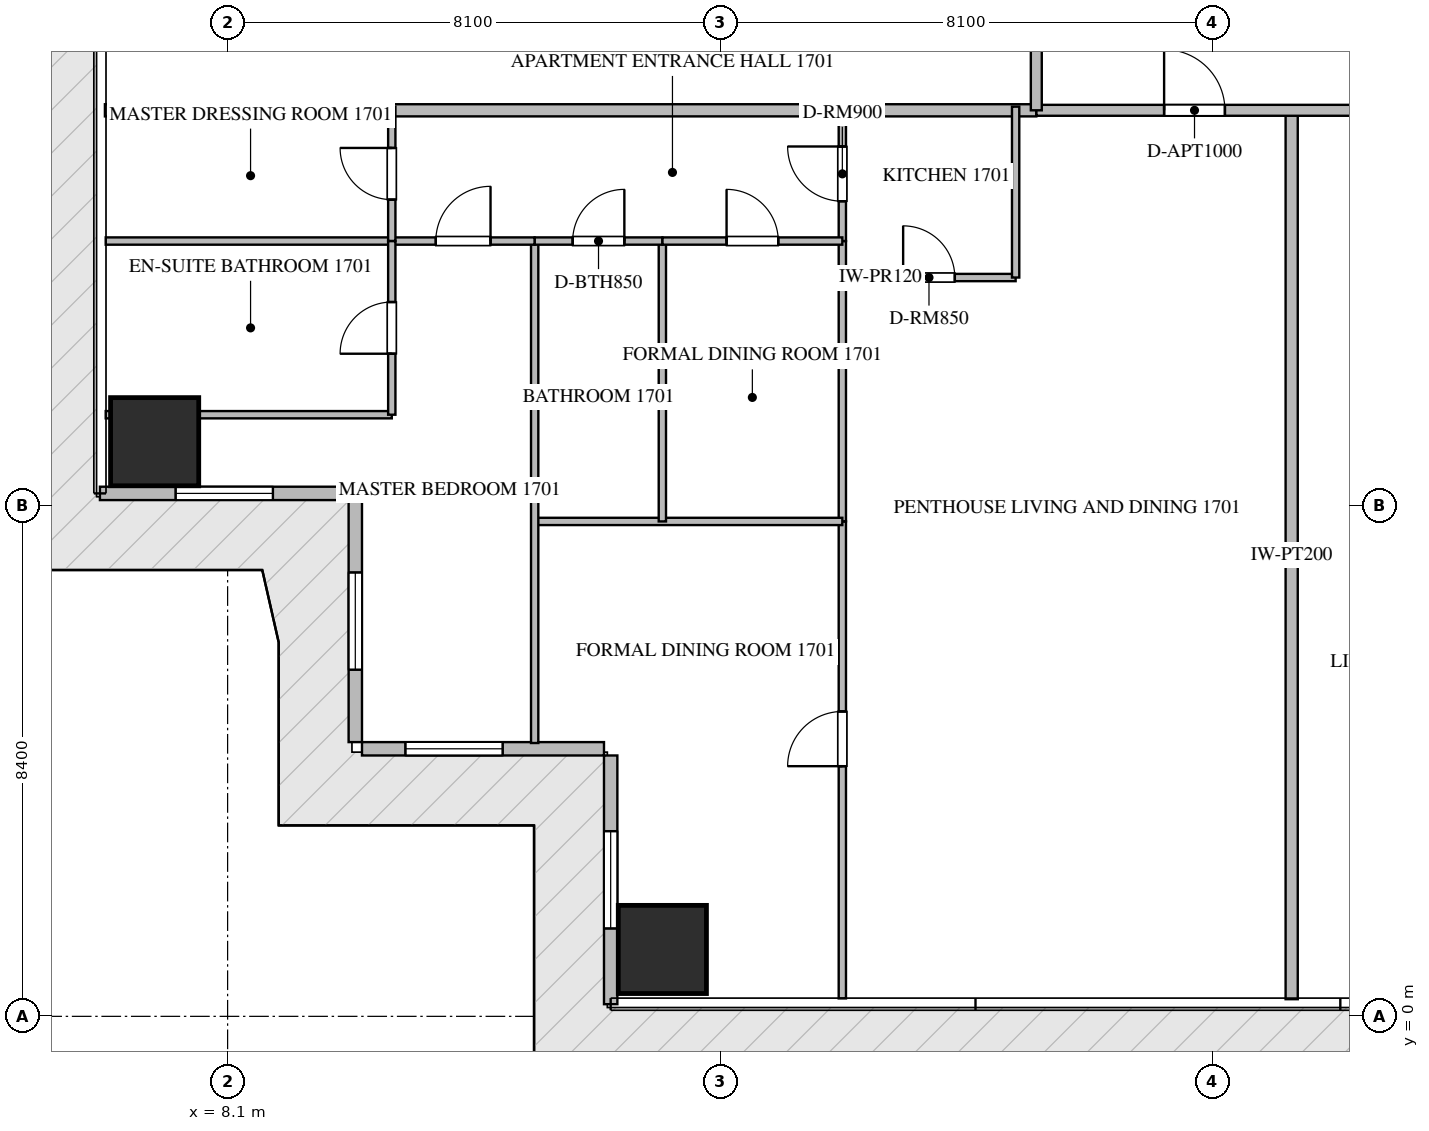
"""IFC4 building model, lengths in metres.
Left out: names, types, materials, properties, quantities, classifications, styles, units other than length and angle.
Written with IfcOpenShell. Run it as: python <this file> out.ifc"""

import sys

from ifc_helpers import new_model, si_unit, direction, frame, frame_2d, origin, origin_2d, place, context, subcontext, project, spatial, rectangle, extrude, source, transform, mapped, element, fill, save


model = new_model("IFC4")
c1 = context("Model", 3, precision=1e-05, world=origin(), true_north=direction((0.0, 1.0)))
c2 = subcontext(c1, "Body", "Model", "MODEL_VIEW")
j1 = project(units=[si_unit("LENGTHUNIT", "METRE"), si_unit("PLANEANGLEUNIT", "RADIAN")], contexts=[c1])
p1 = place(None, origin())
s1 = spatial("IfcSite", under=j1, at=p1, CompositionType="ELEMENT")
p2 = place(p1, origin())
s2 = spatial("IfcBuilding", under=s1, at=p2, CompositionType="ELEMENT")
p3 = place(p2, frame((0.0, 0.0, 71.7)))
s3 = spatial("IfcBuildingStorey", under=s2, at=p3, CompositionType="ELEMENT", Elevation=71.7)
m1 = source(origin(), c2, "Body", "SweptSolid", [
    extrude(rectangle(XDim=1.45, YDim=1.45, at=origin_2d()), origin(), (0.0, 0.0, 1.0), 3.75),
])
for number, where, z_axis, x_axis in (
    (1, (15.25, 1.1, -0.26), (0.0, 0.0, 1.0), (1.0, 0.0, 0.0)),
    (2, (6.9, 9.45, -0.26), (0.0, 0.0, 1.0), (1.0, 0.0, 0.0)),
):
    element("IfcColumn", number, at=place(p3, frame(where, z_axis=z_axis, x_axis=x_axis)), inside=s3, PredefinedType="COLUMN", context=c2, shape_type="MappedRepresentation", body=[
        mapped(m1, transform((0.0, 0.0, 0.0), scale=1.0)),
    ])
p4 = place(p3, frame((6.0, 8.6, 0.0), z_axis=(0.0, 0.0, 1.0), x_axis=(1.0, 0.0, 0.0)))
e3 = element("IfcWall", 3, at=p4, inside=s3, PredefinedType="ELEMENTEDWALL", context=c2, shape_type="SweptSolid", body=[
    extrude(rectangle(XDim=4.09, YDim=0.22, at=frame_2d((2.045, 0.0))), origin(), (0.0, 0.0, 1.0), 3.475),
])
p5 = place(p4, frame((1.245, 0.0, 0.65)))
e4 = element("IfcOpeningElement", 4, at=p5, cuts=e3, PredefinedType="OPENING", context=c2, shape_type="SweptSolid", body=[
    extrude(rectangle(XDim=1.6, YDim=2.1, at=frame_2d((0.8, 1.05))), frame((0.0, 0.12, 0.0), z_axis=(0.0, -1.0, 0.0), x_axis=(1.0, 0.0, 0.0)), (0.0, 0.0, 1.0), 0.24),
])
p6 = place(p3, frame((10.2, 8.49, 0.0), z_axis=(0.0, 0.0, 1.0), x_axis=(0.0, -1.0, 0.0)))
e5 = element("IfcWall", 5, at=p6, inside=s3, PredefinedType="ELEMENTEDWALL", context=c2, shape_type="SweptSolid", body=[
    extrude(rectangle(XDim=3.98, YDim=0.22, at=frame_2d((1.99, 0.0))), origin(), (0.0, 0.0, 1.0), 3.475),
])
p7 = place(p6, frame((1.19, 0.0, 0.65)))
e6 = element("IfcOpeningElement", 6, at=p7, cuts=e5, PredefinedType="OPENING", context=c2, shape_type="SweptSolid", body=[
    extrude(rectangle(XDim=1.6, YDim=2.1, at=frame_2d((0.8, 1.05))), frame((0.0, 0.12, 0.0), z_axis=(0.0, -1.0, 0.0), x_axis=(1.0, 0.0, 0.0)), (0.0, 0.0, 1.0), 0.24),
])
p8 = place(p3, frame((10.31, 4.4, 0.0), z_axis=(0.0, 0.0, 1.0), x_axis=(1.0, 0.0, 0.0)))
e7 = element("IfcWall", 7, at=p8, inside=s3, PredefinedType="ELEMENTEDWALL", context=c2, shape_type="SweptSolid", body=[
    extrude(rectangle(XDim=3.98, YDim=0.22, at=frame_2d((1.99, 0.0))), origin(), (0.0, 0.0, 1.0), 3.475),
])
p9 = place(p8, frame((0.714, 0.0, 0.65)))
e8 = element("IfcOpeningElement", 8, at=p9, cuts=e7, PredefinedType="OPENING", context=c2, shape_type="SweptSolid", body=[
    extrude(rectangle(XDim=1.6, YDim=2.1, at=frame_2d((0.8, 1.05))), frame((0.0, 0.12, 0.0), z_axis=(0.0, -1.0, 0.0), x_axis=(1.0, 0.0, 0.0)), (0.0, 0.0, 1.0), 0.24),
])
p10 = place(p3, frame((14.4, 4.29, 0.0), z_axis=(0.0, 0.0, 1.0), x_axis=(0.0, -1.0, 0.0)))
e9 = element("IfcWall", 9, at=p10, inside=s3, PredefinedType="ELEMENTEDWALL", context=c2, shape_type="SweptSolid", body=[
    extrude(rectangle(XDim=4.09, YDim=0.22, at=frame_2d((2.045, 0.0))), origin(), (0.0, 0.0, 1.0), 3.475),
])
p11 = place(p10, frame((1.245, 0.0, 0.65)))
e10 = element("IfcOpeningElement", 10, at=p11, cuts=e9, PredefinedType="OPENING", context=c2, shape_type="SweptSolid", body=[
    extrude(rectangle(XDim=1.6, YDim=2.1, at=frame_2d((0.8, 1.05))), frame((0.0, 0.12, 0.0), z_axis=(0.0, -1.0, 0.0), x_axis=(1.0, 0.0, 0.0)), (0.0, 0.0, 1.0), 0.24),
])
p12 = place(p3, frame((25.6, 0.282, 0.0), z_axis=(0.0, 0.0, 1.0), x_axis=(0.0, 1.0, 0.0)))
e11 = element("IfcWall", 11, at=p12, inside=s3, PredefinedType="PARTITIONING", context=c2, shape_type="SweptSolid", body=[
    extrude(rectangle(XDim=14.618, YDim=0.2, at=frame_2d((7.309, 0.0))), origin(), (0.0, 0.0, 1.0), 3.49),
])
p13 = place(p3, frame((6.082, 14.9, 0.0), z_axis=(0.0, 0.0, 1.0), x_axis=(1.0, 0.0, 0.0)))
e12 = element("IfcWall", 12, at=p13, inside=s3, PredefinedType="PARTITIONING", context=c2, shape_type="SweptSolid", body=[
    extrude(rectangle(XDim=15.318, YDim=0.2, at=frame_2d((7.659, 0.0))), origin(), (0.0, 0.0, 1.0), 3.49),
])
p14 = place(p3, frame((21.402, 14.9, 0.0), z_axis=(0.0, 0.0, 1.0), x_axis=(1.0, 0.0, 0.0)))
e13 = element("IfcWall", 13, at=p14, inside=s3, PredefinedType="PARTITIONING", context=c2, shape_type="SweptSolid", body=[
    extrude(rectangle(XDim=21.996, YDim=0.18, at=frame_2d((10.998, 0.0))), origin(), (0.0, 0.0, 1.0), 3.49),
])
p15 = place(p14, frame((2.1, 0.0, 0.0)))
e14 = element("IfcOpeningElement", 14, at=p15, cuts=e13, PredefinedType="OPENING", context=c2, shape_type="SweptSolid", body=[
    extrude(rectangle(XDim=1.0, YDim=2.15, at=frame_2d((0.5, 1.075))), frame((0.0, 0.1, 0.0), z_axis=(0.0, -1.0, 0.0), x_axis=(1.0, 0.0, 0.0)), (0.0, 0.0, 1.0), 0.2),
])
p16 = place(p14, frame((6.173, 0.0, 0.0)))
e15 = element("IfcOpeningElement", 15, at=p16, cuts=e13, PredefinedType="OPENING", context=c2, shape_type="SweptSolid", body=[
    extrude(rectangle(XDim=1.0, YDim=2.15, at=frame_2d((0.5, 1.075))), frame((0.0, 0.1, 0.0), z_axis=(0.0, -1.0, 0.0), x_axis=(1.0, 0.0, 0.0)), (0.0, 0.0, 1.0), 0.2),
])
p17 = place(p14, frame((18.896, 0.0, 0.0)))
e16 = element("IfcOpeningElement", 16, at=p17, cuts=e13, PredefinedType="OPENING", context=c2, shape_type="SweptSolid", body=[
    extrude(rectangle(XDim=1.0, YDim=2.15, at=frame_2d((0.5, 1.075))), frame((0.0, 0.1, 0.0), z_axis=(0.0, -1.0, 0.0), x_axis=(1.0, 0.0, 0.0)), (0.0, 0.0, 1.0), 0.2),
])
p18 = place(p3, frame((21.4, 14.9, 0.0), z_axis=(0.0, 0.0, 1.0), x_axis=(0.0, 1.0, 0.0)))
e17 = element("IfcWall", 17, at=p18, inside=s3, PredefinedType="PARTITIONING", context=c2, shape_type="SweptSolid", body=[
    extrude(rectangle(XDim=20.6, YDim=0.18, at=frame_2d((10.3, 0.0))), origin(), (0.0, 0.0, 1.0), 3.49),
])
p19 = place(p18, frame((1.96, 0.0, 0.0)))
e18 = element("IfcOpeningElement", 18, at=p19, cuts=e17, PredefinedType="OPENING", context=c2, shape_type="SweptSolid", body=[
    extrude(rectangle(XDim=1.0, YDim=2.15, at=frame_2d((0.5, 1.075))), frame((0.0, 0.1, 0.0), z_axis=(0.0, -1.0, 0.0), x_axis=(1.0, 0.0, 0.0)), (0.0, 0.0, 1.0), 0.2),
])
p20 = place(p18, frame((15.778, 0.0, 0.0)))
e19 = element("IfcOpeningElement", 19, at=p20, cuts=e17, PredefinedType="OPENING", context=c2, shape_type="SweptSolid", body=[
    extrude(rectangle(XDim=1.0, YDim=2.15, at=frame_2d((0.5, 1.075))), frame((0.0, 0.1, 0.0), z_axis=(0.0, -1.0, 0.0), x_axis=(1.0, 0.0, 0.0)), (0.0, 0.0, 1.0), 0.2),
])
p21 = place(p3, frame((18.21, 12.15, 0.0), z_axis=(0.0, 0.0, 1.0), x_axis=(1.0, 0.0, 0.0)))
e20 = element("IfcWall", 20, at=p21, inside=s3, PredefinedType="PARTITIONING", context=c2, shape_type="SweptSolid", body=[
    extrude(rectangle(XDim=2.85, YDim=0.12, at=frame_2d((1.425, 0.0))), origin(), (0.0, 0.0, 1.0), 3.49),
])
p22 = place(p21, frame((1.0, 0.0, 0.0)))
e21 = element("IfcOpeningElement", 21, at=p22, cuts=e20, PredefinedType="OPENING", context=c2, shape_type="SweptSolid", body=[
    extrude(rectangle(XDim=0.85, YDim=2.1, at=frame_2d((0.425, 1.05))), frame((0.0, 0.07, 0.0), z_axis=(0.0, -1.0, 0.0), x_axis=(1.0, 0.0, 0.0)), (0.0, 0.0, 1.0), 0.14),
])
p23 = place(p3, frame((21.06, 12.15, 0.0), z_axis=(0.0, 0.0, 1.0), x_axis=(0.0, 1.0, 0.0)))
e22 = element("IfcWall", 22, at=p23, inside=s3, PredefinedType="PARTITIONING", context=c2, shape_type="SweptSolid", body=[
    extrude(rectangle(XDim=2.81, YDim=0.12, at=frame_2d((1.405, 0.0))), origin(), (0.0, 0.0, 1.0), 3.49),
])
p24 = place(p3, frame((18.21, 12.75, 0.0), z_axis=(0.0, 0.0, 1.0), x_axis=(0.0, 1.0, 0.0)))
e23 = element("IfcWall", 23, at=p24, inside=s3, PredefinedType="PARTITIONING", context=c2, shape_type="SweptSolid", body=[
    extrude(rectangle(XDim=2.21, YDim=0.12, at=frame_2d((1.105, 0.0))), origin(), (0.0, 0.0, 1.0), 3.49),
])
p25 = place(p24, frame((0.655, 0.0, 0.0)))
e24 = element("IfcOpeningElement", 24, at=p25, cuts=e23, PredefinedType="OPENING", context=c2, shape_type="SweptSolid", body=[
    extrude(rectangle(XDim=0.9, YDim=2.1, at=frame_2d((0.45, 1.05))), frame((0.0, 0.07, 0.0), z_axis=(0.0, -1.0, 0.0), x_axis=(1.0, 0.0, 0.0)), (0.0, 0.0, 1.0), 0.14),
])
p26 = place(p3, frame((18.21, 0.295, 0.0), z_axis=(0.0, 0.0, 1.0), x_axis=(0.0, 1.0, 0.0)))
e25 = element("IfcWall", 25, at=p26, inside=s3, PredefinedType="PARTITIONING", context=c2, shape_type="SweptSolid", body=[
    extrude(rectangle(XDim=7.844, YDim=0.12, at=frame_2d((3.922, 0.0))), origin(), (0.0, 0.0, 1.0), 3.49),
])
p27 = place(p26, frame((3.819, 0.0, 0.0)))
e26 = element("IfcOpeningElement", 26, at=p27, cuts=e25, PredefinedType="OPENING", context=c2, shape_type="SweptSolid", body=[
    extrude(rectangle(XDim=0.9, YDim=2.1, at=frame_2d((0.45, 1.05))), frame((0.0, 0.07, 0.0), z_axis=(0.0, -1.0, 0.0), x_axis=(1.0, 0.0, 0.0)), (0.0, 0.0, 1.0), 0.14),
])
p28 = place(p3, frame((18.21, 8.141, 0.0), z_axis=(0.0, 0.0, 1.0), x_axis=(0.0, 1.0, 0.0)))
e27 = element("IfcWall", 27, at=p28, inside=s3, PredefinedType="PARTITIONING", context=c2, shape_type="SweptSolid", body=[
    extrude(rectangle(XDim=4.607, YDim=0.12, at=frame_2d((2.303, 0.0))), origin(), (0.0, 0.0, 1.0), 3.49),
])
p29 = place(p3, frame((13.15, 8.139, 0.0), z_axis=(0.0, 0.0, 1.0), x_axis=(1.0, 0.0, 0.0)))
e28 = element("IfcWall", 28, at=p29, inside=s3, PredefinedType="PARTITIONING", context=c2, shape_type="SweptSolid", body=[
    extrude(rectangle(XDim=5.06, YDim=0.12, at=frame_2d((2.53, 0.0))), origin(), (0.0, 0.0, 1.0), 3.49),
])
p30 = place(p3, frame((13.15, 4.495, 0.0), z_axis=(0.0, 0.0, 1.0), x_axis=(0.0, 1.0, 0.0)))
e29 = element("IfcWall", 29, at=p30, inside=s3, PredefinedType="PARTITIONING", context=c2, shape_type="SweptSolid", body=[
    extrude(rectangle(XDim=8.255, YDim=0.12, at=frame_2d((4.127, 0.0))), origin(), (0.0, 0.0, 1.0), 3.49),
])
p31 = place(p3, frame((15.25, 8.139, 0.0), z_axis=(0.0, 0.0, 1.0), x_axis=(0.0, 1.0, 0.0)))
e30 = element("IfcWall", 30, at=p31, inside=s3, PredefinedType="PARTITIONING", context=c2, shape_type="SweptSolid", body=[
    extrude(rectangle(XDim=4.611, YDim=0.12, at=frame_2d((2.306, 0.0))), origin(), (0.0, 0.0, 1.0), 2.922),
])
p32 = place(p3, frame((13.15, 12.75, 0.0), z_axis=(0.0, 0.0, 1.0), x_axis=(1.0, 0.0, 0.0)))
e31 = element("IfcWall", 31, at=p32, inside=s3, PredefinedType="PARTITIONING", context=c2, shape_type="SweptSolid", body=[
    extrude(rectangle(XDim=2.1, YDim=0.12, at=frame_2d((1.05, 0.0))), origin(), (0.0, 0.0, 1.0), 3.49),
])
p33 = place(p32, frame((0.625, 0.0, 0.0)))
e32 = element("IfcOpeningElement", 32, at=p33, cuts=e31, PredefinedType="OPENING", context=c2, shape_type="SweptSolid", body=[
    extrude(rectangle(XDim=0.85, YDim=2.1, at=frame_2d((0.425, 1.05))), frame((0.0, 0.07, 0.0), z_axis=(0.0, -1.0, 0.0), x_axis=(1.0, 0.0, 0.0)), (0.0, 0.0, 1.0), 0.14),
])
p34 = place(p3, frame((15.252, 12.75, 0.0), z_axis=(0.0, 0.0, 1.0), x_axis=(1.0, 0.0, 0.0)))
e33 = element("IfcWall", 33, at=p34, inside=s3, PredefinedType="PARTITIONING", context=c2, shape_type="SweptSolid", body=[
    extrude(rectangle(XDim=2.958, YDim=0.12, at=frame_2d((1.479, 0.0))), origin(), (0.0, 0.0, 1.0), 3.49),
])
p35 = place(p34, frame((1.054, 0.0, 0.0)))
e34 = element("IfcOpeningElement", 34, at=p35, cuts=e33, PredefinedType="OPENING", context=c2, shape_type="SweptSolid", body=[
    extrude(rectangle(XDim=0.85, YDim=2.1, at=frame_2d((0.425, 1.05))), frame((0.0, 0.07, 0.0), z_axis=(0.0, -1.0, 0.0), x_axis=(1.0, 0.0, 0.0)), (0.0, 0.0, 1.0), 0.14),
])
p36 = place(p3, frame((10.8, 12.75, 0.0), z_axis=(0.0, 0.0, 1.0), x_axis=(1.0, 0.0, 0.0)))
e35 = element("IfcWall", 35, at=p36, inside=s3, PredefinedType="PARTITIONING", context=c2, shape_type="SweptSolid", body=[
    extrude(rectangle(XDim=2.348, YDim=0.12, at=frame_2d((1.174, 0.0))), origin(), (0.0, 0.0, 1.0), 3.49),
])
p37 = place(p36, frame((0.724, 0.0, 0.0)))
e36 = element("IfcOpeningElement", 36, at=p37, cuts=e35, PredefinedType="OPENING", context=c2, shape_type="SweptSolid", body=[
    extrude(rectangle(XDim=0.9, YDim=2.1, at=frame_2d((0.45, 1.05))), frame((0.0, 0.07, 0.0), z_axis=(0.0, -1.0, 0.0), x_axis=(1.0, 0.0, 0.0)), (0.0, 0.0, 1.0), 0.14),
])
p38 = place(p3, frame((6.095, 9.894, 0.0), z_axis=(0.0, 0.0, 1.0), x_axis=(1.0, 0.0, 0.0)))
e37 = element("IfcWall", 37, at=p38, inside=s3, PredefinedType="PARTITIONING", context=c2, shape_type="SweptSolid", body=[
    extrude(rectangle(XDim=4.705, YDim=0.12, at=frame_2d((2.353, 0.0))), origin(), (0.0, 0.0, 1.0), 3.49),
])
p39 = place(p3, frame((6.095, 12.75, 0.0), z_axis=(0.0, 0.0, 1.0), x_axis=(1.0, 0.0, 0.0)))
e38 = element("IfcWall", 38, at=p39, inside=s3, PredefinedType="PARTITIONING", context=c2, shape_type="SweptSolid", body=[
    extrude(rectangle(XDim=4.703, YDim=0.12, at=frame_2d((2.352, 0.0))), origin(), (0.0, 0.0, 1.0), 3.49),
])
p40 = place(p3, frame((10.8, 9.894, 0.0), z_axis=(0.0, 0.0, 1.0), x_axis=(0.0, 1.0, 0.0)))
e39 = element("IfcWall", 39, at=p40, inside=s3, PredefinedType="PARTITIONING", context=c2, shape_type="SweptSolid", body=[
    extrude(rectangle(XDim=2.856, YDim=0.12, at=frame_2d((1.428, 0.0))), origin(), (0.0, 0.0, 1.0), 3.49),
])
p41 = place(p40, frame((1.003, 0.0, 0.0)))
e40 = element("IfcOpeningElement", 40, at=p41, cuts=e39, PredefinedType="OPENING", context=c2, shape_type="SweptSolid", body=[
    extrude(rectangle(XDim=0.85, YDim=2.1, at=frame_2d((0.425, 1.05))), frame((0.0, 0.07, 0.0), z_axis=(0.0, -1.0, 0.0), x_axis=(1.0, 0.0, 0.0)), (0.0, 0.0, 1.0), 0.14),
])
p42 = place(p3, frame((10.8, 12.752, 0.0), z_axis=(0.0, 0.0, 1.0), x_axis=(0.0, 1.0, 0.0)))
e41 = element("IfcWall", 41, at=p42, inside=s3, PredefinedType="PARTITIONING", context=c2, shape_type="SweptSolid", body=[
    extrude(rectangle(XDim=2.208, YDim=0.12, at=frame_2d((1.104, 0.0))), origin(), (0.0, 0.0, 1.0), 3.49),
])
p43 = place(p42, frame((0.679, 0.0, 0.0)))
e42 = element("IfcOpeningElement", 42, at=p43, cuts=e41, PredefinedType="OPENING", context=c2, shape_type="SweptSolid", body=[
    extrude(rectangle(XDim=0.85, YDim=2.1, at=frame_2d((0.425, 1.05))), frame((0.0, 0.07, 0.0), z_axis=(0.0, -1.0, 0.0), x_axis=(1.0, 0.0, 0.0)), (0.0, 0.0, 1.0), 0.14),
])
m2 = source(origin(), c2, "Body", "SweptSolid", [
    extrude(rectangle(XDim=1.6, YDim=2.1, at=frame_2d((0.8, 1.05))), frame((0.0, 0.03, 0.0), z_axis=(0.0, -1.0, 0.0), x_axis=(1.0, 0.0, 0.0)), (0.0, 0.0, 1.0), 0.06),
])
p44 = place(p5, origin())
e43 = element("IfcWindow", 43, at=p44, inside=s3, PartitioningType="SINGLE_PANEL", PredefinedType="WINDOW", context=c2, shape_type="MappedRepresentation", body=[
    mapped(m2, transform((0.0, 0.0, 0.0), scale=1.0)),
])
fill(e4, e43)
p45 = place(p7, origin())
e44 = element("IfcWindow", 44, at=p45, inside=s3, PartitioningType="SINGLE_PANEL", PredefinedType="WINDOW", context=c2, shape_type="MappedRepresentation", body=[
    mapped(m2, transform((0.0, 0.0, 0.0), scale=1.0)),
])
fill(e6, e44)
p46 = place(p9, origin())
e45 = element("IfcWindow", 45, at=p46, inside=s3, PartitioningType="SINGLE_PANEL", PredefinedType="WINDOW", context=c2, shape_type="MappedRepresentation", body=[
    mapped(m2, transform((0.0, 0.0, 0.0), scale=1.0)),
])
fill(e8, e45)
p47 = place(p11, origin())
e46 = element("IfcWindow", 46, at=p47, inside=s3, PartitioningType="SINGLE_PANEL", PredefinedType="WINDOW", context=c2, shape_type="MappedRepresentation", body=[
    mapped(m2, transform((0.0, 0.0, 0.0), scale=1.0)),
])
fill(e10, e46)
m3 = source(origin(), c2, "Body", "SweptSolid", [
    extrude(rectangle(XDim=1.0, YDim=2.15, at=frame_2d((0.5, 1.075))), frame((0.0, 0.025, 0.0), z_axis=(0.0, -1.0, 0.0), x_axis=(1.0, 0.0, 0.0)), (0.0, 0.0, 1.0), 0.05),
])
p48 = place(p15, origin())
e47 = element("IfcDoor", 47, at=p48, inside=s3, OperationType="SINGLE_SWING_LEFT", PredefinedType="DOOR", context=c2, shape_type="MappedRepresentation", body=[
    mapped(m3, transform((0.0, 0.0, 0.0), scale=1.0)),
])
fill(e14, e47)
m4 = source(origin(), c2, "Body", "SweptSolid", [
    extrude(rectangle(XDim=0.85, YDim=2.1, at=frame_2d((0.425, 1.05))), frame((0.0, 0.025, 0.0), z_axis=(0.0, -1.0, 0.0), x_axis=(1.0, 0.0, 0.0)), (0.0, 0.0, 1.0), 0.05),
])
p49 = place(p22, origin())
e48 = element("IfcDoor", 48, at=p49, inside=s3, OperationType="SINGLE_SWING_LEFT", PredefinedType="DOOR", context=c2, shape_type="MappedRepresentation", body=[
    mapped(m4, transform((0.0, 0.0, 0.0), scale=1.0)),
])
fill(e21, e48)
m5 = source(origin(), c2, "Body", "SweptSolid", [
    extrude(rectangle(XDim=0.9, YDim=2.1, at=frame_2d((0.45, 1.05))), frame((0.0, 0.025, 0.0), z_axis=(0.0, -1.0, 0.0), x_axis=(1.0, 0.0, 0.0)), (0.0, 0.0, 1.0), 0.05),
])
p50 = place(p25, origin())
e49 = element("IfcDoor", 49, at=p50, inside=s3, OperationType="SINGLE_SWING_RIGHT", PredefinedType="DOOR", context=c2, shape_type="MappedRepresentation", body=[
    mapped(m5, transform((0.0, 0.0, 0.0), scale=1.0)),
])
fill(e24, e49)
p51 = place(p27, origin())
e50 = element("IfcDoor", 50, at=p51, inside=s3, OperationType="SINGLE_SWING_LEFT", PredefinedType="DOOR", context=c2, shape_type="MappedRepresentation", body=[
    mapped(m5, transform((0.0, 0.0, 0.0), scale=1.0)),
])
fill(e26, e50)
p52 = place(p33, origin())
e51 = element("IfcDoor", 51, at=p52, inside=s3, OperationType="SINGLE_SWING_RIGHT", PredefinedType="DOOR", context=c2, shape_type="MappedRepresentation", body=[
    mapped(m4, transform((0.0, 0.0, 0.0), scale=1.0)),
])
fill(e32, e51)
p53 = place(p35, origin())
e52 = element("IfcDoor", 52, at=p53, inside=s3, OperationType="SINGLE_SWING_LEFT", PredefinedType="DOOR", context=c2, shape_type="MappedRepresentation", body=[
    mapped(m4, transform((0.0, 0.0, 0.0), scale=1.0)),
])
fill(e34, e52)
p54 = place(p37, origin())
e53 = element("IfcDoor", 53, at=p54, inside=s3, OperationType="SINGLE_SWING_RIGHT", PredefinedType="DOOR", context=c2, shape_type="MappedRepresentation", body=[
    mapped(m5, transform((0.0, 0.0, 0.0), scale=1.0)),
])
fill(e36, e53)
p55 = place(p41, origin())
e54 = element("IfcDoor", 54, at=p55, inside=s3, OperationType="SINGLE_SWING_LEFT", PredefinedType="DOOR", context=c2, shape_type="MappedRepresentation", body=[
    mapped(m4, transform((0.0, 0.0, 0.0), scale=1.0)),
])
fill(e40, e54)
p56 = place(p43, origin())
e55 = element("IfcDoor", 55, at=p56, inside=s3, OperationType="SINGLE_SWING_RIGHT", PredefinedType="DOOR", context=c2, shape_type="MappedRepresentation", body=[
    mapped(m4, transform((0.0, 0.0, 0.0), scale=1.0)),
])
fill(e42, e55)
save(model, sys.argv[1])
